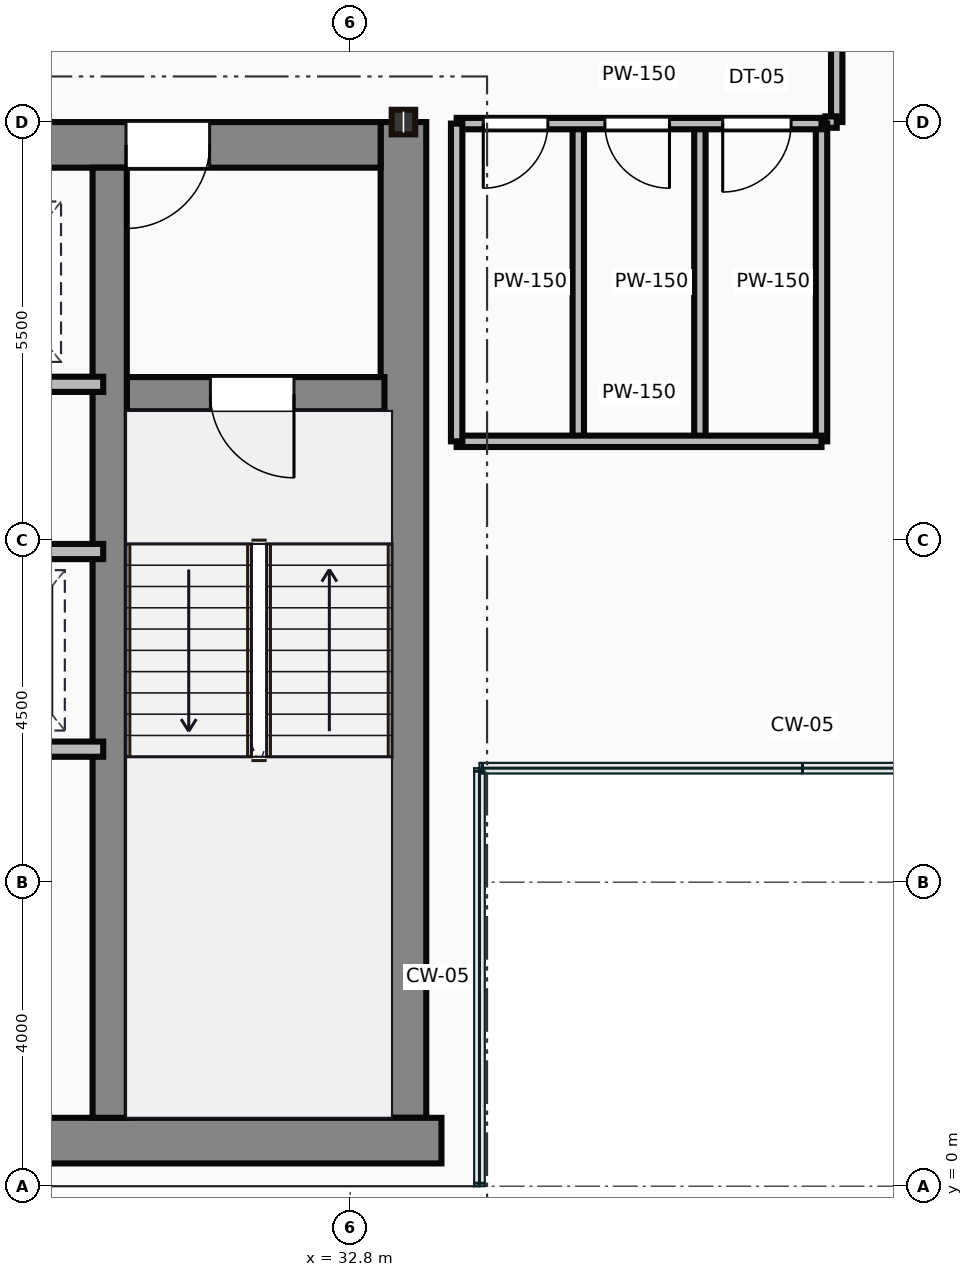
"""IFC4 building model, lengths in metres.
Left out: names, types, materials, properties, quantities, classifications, styles, units other than length and angle.
Written with IfcOpenShell. Run it as: python <this file> out.ifc"""

import sys

from ifc_helpers import new_model, si_unit, direction, frame, frame_2d, origin, origin_2d, place, context, subcontext, project, spatial, rectangle, i_section, extrude, source, transform, mapped, element, fill, save


model = new_model("IFC4")
c1 = context("Model", 3, precision=1e-05, world=origin(), true_north=direction((0.0, 1.0)))
c2 = subcontext(c1, "Body", "Model", "MODEL_VIEW")
j1 = project(units=[si_unit("LENGTHUNIT", "METRE"), si_unit("PLANEANGLEUNIT", "RADIAN")], contexts=[c1])
p1 = place(None, origin())
s1 = spatial("IfcSite", under=j1, at=p1, CompositionType="ELEMENT")
p2 = place(p1, origin())
s2 = spatial("IfcBuilding", under=s1, at=p2, CompositionType="ELEMENT")
p3 = place(p2, frame((0.0, 0.0, 255.15)))
s3 = spatial("IfcBuildingStorey", under=s2, at=p3, CompositionType="ELEMENT", Elevation=255.15)
m1 = source(origin(), c2, "Body", "SweptSolid", [
    extrude(rectangle(XDim=29.5, YDim=0.6, at=frame_2d((14.75, 0.0))), origin(), (0.0, 0.0, 1.0), 3.65),
])
p4 = place(p3, frame((4.5, 0.6, 0.0), z_axis=(0.0, 0.0, 1.0), x_axis=(1.0, 0.0, 0.0)))
e1 = element("IfcWall", 1, at=p4, inside=s3, PredefinedType="SHEAR", context=c2, shape_type="MappedRepresentation", body=[
    mapped(m1, transform((0.0, 0.0, 0.0))),
])
m2 = source(origin(), c2, "Body", "SweptSolid", [
    extrude(rectangle(XDim=13.1, YDim=0.6, at=frame_2d((6.55, 0.0))), origin(), (0.0, 0.0, 1.0), 3.65),
])
p5 = place(p3, frame((33.5, 0.9, 0.0), z_axis=(0.0, 0.0, 1.0), x_axis=(0.0, 1.0, 0.0)))
e2 = element("IfcWall", 2, at=p5, inside=s3, PredefinedType="SHEAR", context=c2, shape_type="MappedRepresentation", body=[
    mapped(m2, transform((0.0, 0.0, 0.0))),
])
m3 = source(origin(), c2, "Body", "SweptSolid", [
    extrude(rectangle(XDim=12.6, YDim=0.6, at=frame_2d((6.3, 0.0))), origin(), (0.0, 0.0, 1.0), 3.65),
])
p6 = place(p3, frame((20.6, 13.7, 0.0), z_axis=(0.0, 0.0, 1.0), x_axis=(1.0, 0.0, 0.0)))
e3 = element("IfcWall", 3, at=p6, inside=s3, PredefinedType="SHEAR", context=c2, shape_type="MappedRepresentation", body=[
    mapped(m3, transform((0.0, 0.0, 0.0))),
])
p7 = place(p6, frame((9.25, 0.0, 0.0)))
e4 = element("IfcOpeningElement", 4, at=p7, cuts=e3, PredefinedType="OPENING", context=c2, shape_type="SweptSolid", body=[
    extrude(rectangle(XDim=1.1, YDim=2.15, at=frame_2d((0.55, 1.075))), frame((0.0, 0.31, 0.0), z_axis=(0.0, -1.0, 0.0), x_axis=(1.0, 0.0, 0.0)), (0.0, 0.0, 1.0), 0.62),
])
m4 = source(origin(), c2, "Body", "SweptSolid", [
    extrude(rectangle(XDim=12.5, YDim=0.45, at=frame_2d((6.25, 0.0))), origin(), (0.0, 0.0, 1.0), 3.65),
])
p8 = place(p3, frame((29.635, 0.9, 0.0), z_axis=(0.0, 0.0, 1.0), x_axis=(0.0, 1.0, 0.0)))
e5 = element("IfcWall", 5, at=p8, inside=s3, PredefinedType="SHEAR", context=c2, shape_type="MappedRepresentation", body=[
    mapped(m4, transform((0.0, 0.0, 0.0))),
])
m5 = source(origin(), c2, "Body", "SweptSolid", [
    extrude(rectangle(XDim=3.39, YDim=0.45, at=frame_2d((1.695, 0.0))), origin(), (0.0, 0.0, 1.0), 3.65),
])
p9 = place(p3, frame((29.86, 10.42, 0.0), z_axis=(0.0, 0.0, 1.0), x_axis=(1.0, 0.0, 0.0)))
e6 = element("IfcWall", 6, at=p9, inside=s3, PredefinedType="SHEAR", context=c2, shape_type="MappedRepresentation", body=[
    mapped(m5, transform((0.0, 0.0, 0.0))),
])
p10 = place(p9, frame((1.1, 0.0, 0.0)))
e7 = element("IfcOpeningElement", 7, at=p10, cuts=e6, PredefinedType="OPENING", context=c2, shape_type="SweptSolid", body=[
    extrude(rectangle(XDim=1.1, YDim=2.15, at=frame_2d((0.55, 1.075))), frame((0.0, 0.235, 0.0), z_axis=(0.0, -1.0, 0.0), x_axis=(1.0, 0.0, 0.0)), (0.0, 0.0, 1.0), 0.47),
])
m6 = source(origin(), c2, "Body", "SweptSolid", [
    extrude(i_section(OverallWidth=0.309, OverallDepth=0.323, WebThickness=0.014, FlangeThickness=0.023, at=origin_2d()), origin(), (0.0, 0.0, 1.0), 3.65),
])
p11 = place(p3, frame((33.5, 14.0, 0.0), z_axis=(0.0, 0.0, 1.0), x_axis=(1.0, 0.0, 0.0)))
e8 = element("IfcColumn", 8, at=p11, inside=s3, PredefinedType="COLUMN", context=c2, shape_type="MappedRepresentation", body=[
    mapped(m6, transform((0.0, 0.0, 0.0))),
])
m7 = source(origin(), c2, "Body", "SweptSolid", [
    extrude(rectangle(XDim=8.8, YDim=0.2, at=frame_2d((4.4, 0.0))), origin(), (0.0, 0.0, 1.0), 3.4),
])
p12 = place(p3, frame((20.75, 10.55, 0.0), z_axis=(0.0, 0.0, 1.0), x_axis=(1.0, 0.0, 0.0)))
e9 = element("IfcWall", 9, at=p12, inside=s3, PredefinedType="PARTITIONING", context=c2, shape_type="MappedRepresentation", body=[
    mapped(m7, transform((0.0, 0.0, 0.0))),
])
p13 = place(p12, frame((0.5, 0.0, 0.0)))
e10 = element("IfcOpeningElement", 10, at=p13, cuts=e9, PredefinedType="OPENING", context=c2, shape_type="SweptSolid", body=[
    extrude(rectangle(XDim=1.05, YDim=2.15, at=frame_2d((0.525, 1.075))), frame((0.0, 0.11, 0.0), z_axis=(0.0, -1.0, 0.0), x_axis=(1.0, 0.0, 0.0)), (0.0, 0.0, 1.0), 0.22),
])
p14 = place(p12, frame((2.6, 0.0, 0.0)))
e11 = element("IfcOpeningElement", 11, at=p14, cuts=e9, PredefinedType="OPENING", context=c2, shape_type="SweptSolid", body=[
    extrude(rectangle(XDim=1.05, YDim=2.15, at=frame_2d((0.525, 1.075))), frame((0.0, 0.11, 0.0), z_axis=(0.0, -1.0, 0.0), x_axis=(1.0, 0.0, 0.0)), (0.0, 0.0, 1.0), 0.22),
])
p15 = place(p12, frame((4.7, 0.0, 0.0)))
e12 = element("IfcOpeningElement", 12, at=p15, cuts=e9, PredefinedType="OPENING", context=c2, shape_type="SweptSolid", body=[
    extrude(rectangle(XDim=1.05, YDim=2.15, at=frame_2d((0.525, 1.075))), frame((0.0, 0.11, 0.0), z_axis=(0.0, -1.0, 0.0), x_axis=(1.0, 0.0, 0.0)), (0.0, 0.0, 1.0), 0.22),
])
p16 = place(p12, frame((6.8, 0.0, 0.0)))
e13 = element("IfcOpeningElement", 13, at=p16, cuts=e9, PredefinedType="OPENING", context=c2, shape_type="SweptSolid", body=[
    extrude(rectangle(XDim=1.05, YDim=2.15, at=frame_2d((0.525, 1.075))), frame((0.0, 0.11, 0.0), z_axis=(0.0, -1.0, 0.0), x_axis=(1.0, 0.0, 0.0)), (0.0, 0.0, 1.0), 0.22),
])
m8 = source(origin(), c2, "Body", "SweptSolid", [
    extrude(rectangle(XDim=4.55, YDim=0.2, at=frame_2d((2.275, 0.0))), origin(), (0.0, 0.0, 1.0), 3.4),
])
p17 = place(p3, frame((25.0, 8.35, 0.0), z_axis=(0.0, 0.0, 1.0), x_axis=(1.0, 0.0, 0.0)))
e14 = element("IfcWall", 14, at=p17, inside=s3, PredefinedType="PARTITIONING", context=c2, shape_type="MappedRepresentation", body=[
    mapped(m8, transform((0.0, 0.0, 0.0))),
])
p18 = place(p17, frame((0.5, 0.0, 0.0)))
e15 = element("IfcOpeningElement", 15, at=p18, cuts=e14, PredefinedType="OPENING", context=c2, shape_type="SweptSolid", body=[
    extrude(rectangle(XDim=1.05, YDim=2.15, at=frame_2d((0.525, 1.075))), frame((0.0, 0.11, 0.0), z_axis=(0.0, -1.0, 0.0), x_axis=(1.0, 0.0, 0.0)), (0.0, 0.0, 1.0), 0.22),
])
p19 = place(p17, frame((2.6, 0.0, 0.0)))
e16 = element("IfcOpeningElement", 16, at=p19, cuts=e14, PredefinedType="OPENING", context=c2, shape_type="SweptSolid", body=[
    extrude(rectangle(XDim=1.05, YDim=2.15, at=frame_2d((0.525, 1.075))), frame((0.0, 0.11, 0.0), z_axis=(0.0, -1.0, 0.0), x_axis=(1.0, 0.0, 0.0)), (0.0, 0.0, 1.0), 0.22),
])
p20 = place(p3, frame((25.0, 5.75, 0.0), z_axis=(0.0, 0.0, 1.0), x_axis=(1.0, 0.0, 0.0)))
e17 = element("IfcWall", 17, at=p20, inside=s3, PredefinedType="PARTITIONING", context=c2, shape_type="MappedRepresentation", body=[
    mapped(m8, transform((0.0, 0.0, 0.0))),
])
m9 = source(origin(), c2, "Body", "SweptSolid", [
    extrude(rectangle(XDim=4.8, YDim=0.15, at=frame_2d((2.4, 0.0))), origin(), (0.0, 0.0, 1.0), 2.787),
])
p21 = place(p3, frame((34.2, 13.98, 0.0), z_axis=(0.0, 0.0, 1.0), x_axis=(1.0, 0.0, 0.0)))
e18 = element("IfcWall", 18, at=p21, inside=s3, PredefinedType="PARTITIONING", context=c2, shape_type="MappedRepresentation", body=[
    mapped(m9, transform((0.0, 0.0, 0.0))),
])
p22 = place(p21, frame((0.35, 0.0, 0.0)))
e19 = element("IfcOpeningElement", 19, at=p22, cuts=e18, PredefinedType="OPENING", context=c2, shape_type="SweptSolid", body=[
    extrude(rectangle(XDim=0.85, YDim=2.1, at=frame_2d((0.425, 1.05))), frame((0.0, 0.085, 0.0), z_axis=(0.0, -1.0, 0.0), x_axis=(1.0, 0.0, 0.0)), (0.0, 0.0, 1.0), 0.17),
])
p23 = place(p21, frame((1.95, 0.0, 0.0)))
e20 = element("IfcOpeningElement", 20, at=p23, cuts=e18, PredefinedType="OPENING", context=c2, shape_type="SweptSolid", body=[
    extrude(rectangle(XDim=0.85, YDim=2.1, at=frame_2d((0.425, 1.05))), frame((0.0, 0.085, 0.0), z_axis=(0.0, -1.0, 0.0), x_axis=(1.0, 0.0, 0.0)), (0.0, 0.0, 1.0), 0.17),
])
p24 = place(p21, frame((3.5, 0.0, 0.0)))
e21 = element("IfcOpeningElement", 21, at=p24, cuts=e18, PredefinedType="OPENING", context=c2, shape_type="SweptSolid", body=[
    extrude(rectangle(XDim=0.9, YDim=2.1, at=frame_2d((0.45, 1.05))), frame((0.0, 0.085, 0.0), z_axis=(0.0, -1.0, 0.0), x_axis=(1.0, 0.0, 0.0)), (0.0, 0.0, 1.0), 0.17),
])
m10 = source(origin(), c2, "Body", "SweptSolid", [
    extrude(rectangle(XDim=4.8, YDim=0.15, at=frame_2d((2.4, 0.0))), origin(), (0.0, 0.0, 1.0), 3.4),
])
p25 = place(p3, frame((34.2, 9.8, 0.0), z_axis=(0.0, 0.0, 1.0), x_axis=(1.0, 0.0, 0.0)))
e22 = element("IfcWall", 22, at=p25, inside=s3, PredefinedType="PARTITIONING", context=c2, shape_type="MappedRepresentation", body=[
    mapped(m10, transform((0.0, 0.0, 0.0))),
])
m11 = source(origin(), c2, "Body", "SweptSolid", [
    extrude(rectangle(XDim=4.18, YDim=0.15, at=frame_2d((2.09, 0.0))), origin(), (0.0, 0.0, 1.0), 3.4),
])
for number, where, z_axis, x_axis in (
    (23, (39.0, 9.8, 0.0), (0.0, 0.0, 1.0), (0.0, 1.0, 0.0)),
    (24, (34.2, 9.8, 0.0), (0.0, 0.0, 1.0), (0.0, 1.0, 0.0)),
    (25, (35.8, 9.8, 0.0), (0.0, 0.0, 1.0), (0.0, 1.0, 0.0)),
    (26, (37.4, 9.8, 0.0), (0.0, 0.0, 1.0), (0.0, 1.0, 0.0)),
):
    element("IfcWall", number, at=place(p3, frame(where, z_axis=z_axis, x_axis=x_axis)), inside=s3, PredefinedType="PARTITIONING", context=c2, shape_type="MappedRepresentation", body=[
        mapped(m11, transform((0.0, 0.0, 0.0))),
    ])
m12 = source(origin(), c2, "Body", "SweptSolid", [
    extrude(rectangle(XDim=2.2, YDim=0.15, at=frame_2d((1.1, 0.0))), origin(), (0.0, 0.0, 1.0), 3.4),
])
p26 = place(p3, frame((39.2, 16.2, 0.0), z_axis=(0.0, 0.0, 1.0), x_axis=(0.0, -1.0, 0.0)))
e27 = element("IfcWall", 27, at=p26, inside=s3, PredefinedType="PARTITIONING", context=c2, shape_type="MappedRepresentation", body=[
    mapped(m12, transform((0.0, 0.0, 0.0))),
])
m13 = source(origin(), c2, "Body", "SweptSolid", [
    extrude(rectangle(XDim=0.15, YDim=0.15, at=frame_2d((0.075, 0.0))), origin(), (0.0, 0.0, 1.0), 3.4),
])
p27 = place(p3, frame((39.2, 14.0, 0.0), z_axis=(0.0, 0.0, 1.0), x_axis=(-1.0, 0.0, 0.0)))
e28 = element("IfcWall", 28, at=p27, inside=s3, PredefinedType="PARTITIONING", context=c2, shape_type="MappedRepresentation", body=[
    mapped(m13, transform((0.0, 0.0, 0.0))),
])
m14 = source(origin(), c2, "Body", "SweptSolid", [
    extrude(rectangle(XDim=1.1, YDim=2.15, at=frame_2d((0.55, 1.075))), frame((0.0, 0.025, 0.0), z_axis=(0.0, -1.0, 0.0), x_axis=(1.0, 0.0, 0.0)), (0.0, 0.0, 1.0), 0.05),
])
p28 = place(p10, frame((1.1, 0.0, 0.0), z_axis=(0.0, 0.0, 1.0), x_axis=(-1.0, 0.0, 0.0)))
e29 = element("IfcDoor", 29, at=p28, inside=s3, OperationType="SINGLE_SWING_RIGHT", PredefinedType="DOOR", context=c2, shape_type="MappedRepresentation", body=[
    mapped(m14, transform((0.0, 0.0, 0.0))),
])
fill(e7, e29)
p29 = place(p7, origin())
e30 = element("IfcDoor", 30, at=p29, inside=s3, OperationType="SINGLE_SWING_LEFT", PredefinedType="DOOR", context=c2, shape_type="MappedRepresentation", body=[
    mapped(m14, transform((0.0, 0.0, 0.0))),
])
fill(e4, e30)
m15 = source(origin(), c2, "Body", "SweptSolid", [
    extrude(rectangle(XDim=0.85, YDim=2.1, at=frame_2d((0.425, 1.05))), frame((0.0, 0.025, 0.0), z_axis=(0.0, -1.0, 0.0), x_axis=(1.0, 0.0, 0.0)), (0.0, 0.0, 1.0), 0.05),
])
p30 = place(p22, frame((0.85, 0.0, 0.0), z_axis=(0.0, 0.0, 1.0), x_axis=(-1.0, 0.0, 0.0)))
e31 = element("IfcDoor", 31, at=p30, inside=s3, OperationType="SINGLE_SWING_LEFT", PredefinedType="DOOR", context=c2, shape_type="MappedRepresentation", body=[
    mapped(m15, transform((0.0, 0.0, 0.0))),
])
fill(e19, e31)
p31 = place(p23, frame((0.85, 0.0, 0.0), z_axis=(0.0, 0.0, 1.0), x_axis=(-1.0, 0.0, 0.0)))
e32 = element("IfcDoor", 32, at=p31, inside=s3, OperationType="SINGLE_SWING_RIGHT", PredefinedType="DOOR", context=c2, shape_type="MappedRepresentation", body=[
    mapped(m15, transform((0.0, 0.0, 0.0))),
])
fill(e20, e32)
m16 = source(origin(), c2, "Body", "SweptSolid", [
    extrude(rectangle(XDim=0.9, YDim=2.1, at=frame_2d((0.45, 1.05))), frame((0.0, 0.025, 0.0), z_axis=(0.0, -1.0, 0.0), x_axis=(1.0, 0.0, 0.0)), (0.0, 0.0, 1.0), 0.05),
])
p32 = place(p24, frame((0.9, 0.0, 0.0), z_axis=(0.0, 0.0, 1.0), x_axis=(-1.0, 0.0, 0.0)))
e33 = element("IfcDoor", 33, at=p32, inside=s3, OperationType="SINGLE_SWING_LEFT", PredefinedType="DOOR", context=c2, shape_type="MappedRepresentation", body=[
    mapped(m16, transform((0.0, 0.0, 0.0))),
])
fill(e21, e33)
save(model, sys.argv[1])
